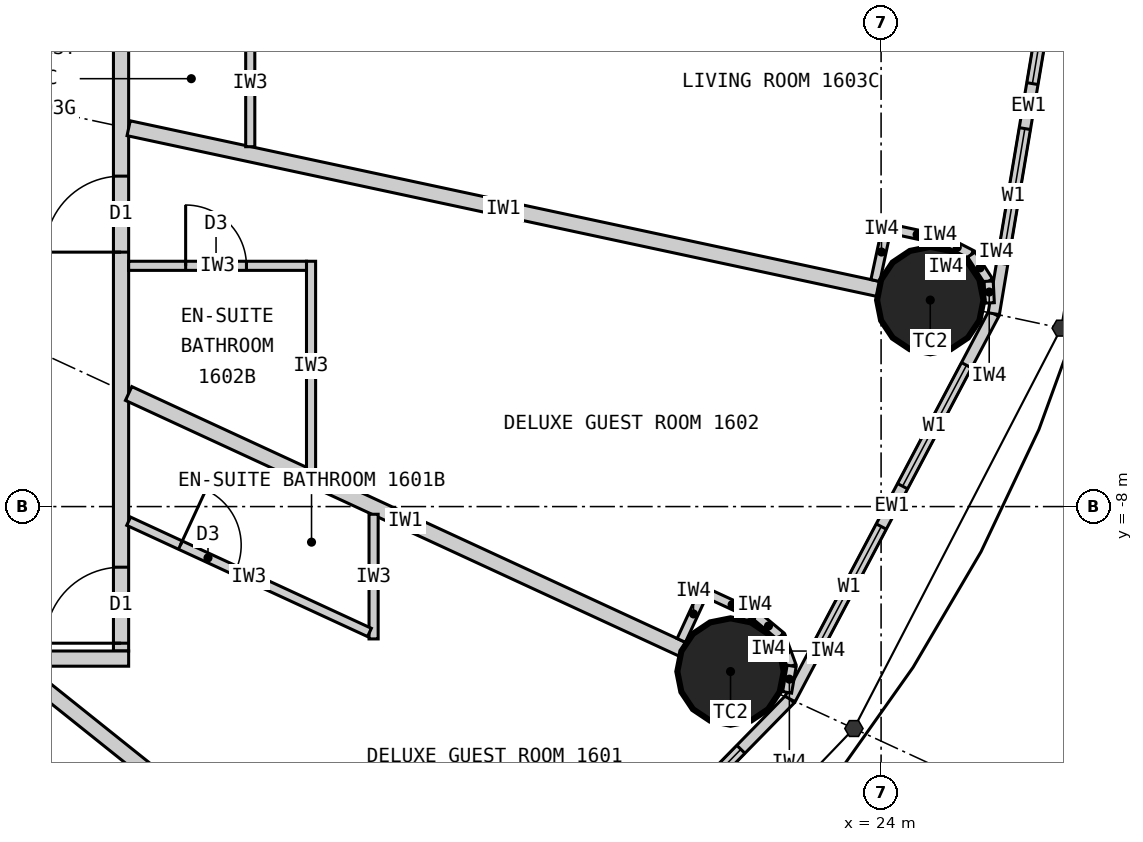
"""IFC4 building model, lengths in metres.
Left out: names, types, materials, properties, quantities, classifications, styles, units other than length and angle.
Written with IfcOpenShell. Run it as: python <this file> out.ifc"""

import sys

from ifc_helpers import new_model, si_unit, direction, frame, frame_2d, origin, origin_2d, place, context, subcontext, project, spatial, rectangle, circle, extrude, element, fill, save


model = new_model("IFC4")
c1 = context("Model", 3, precision=1e-05, world=origin(), true_north=direction((0.0, 1.0)))
c2 = subcontext(c1, "Body", "Model", "MODEL_VIEW")
j1 = project(units=[si_unit("LENGTHUNIT", "METRE"), si_unit("PLANEANGLEUNIT", "RADIAN")], contexts=[c1])
p1 = place(None, origin())
s1 = spatial("IfcSite", under=j1, at=p1, CompositionType="ELEMENT")
p2 = place(p1, origin())
s2 = spatial("IfcBuilding", under=s1, at=p2, CompositionType="ELEMENT")
p3 = place(p2, frame((0.0, 0.0, 67.2)))
s3 = spatial("IfcBuildingStorey", under=s2, at=p3, CompositionType="ELEMENT", Elevation=67.2)
for number, where, z_axis, x_axis in (
    (1, (22.019, -10.17, 0.0), (0.0, 0.0, 1.0), (1.0, 0.0, 0.0)),
    (2, (24.647, -5.283, 0.0), (0.0, 0.0, 1.0), (1.0, 0.0, 0.0)),
):
    element("IfcColumn", number, at=place(p3, frame(where, z_axis=z_axis, x_axis=x_axis)), inside=s3, PredefinedType="COLUMN", context=c2, shape_type="SweptSolid", body=[
        extrude(circle(Radius=0.7, at=origin_2d()), origin(), (0.0, 0.0, 1.0), 3.3),
    ])
p4 = place(p3, frame((18.57, -14.856, 0.0), z_axis=(0.0, 0.0, 1.0), x_axis=(0.699602905915, 0.714531856557, 0.0)))
e3 = element("IfcWall", 3, at=p4, inside=s3, PredefinedType="ELEMENTEDWALL", context=c2, shape_type="SweptSolid", body=[
    extrude(rectangle(XDim=6.051, YDim=0.15, at=frame_2d((3.025, 0.0))), origin(), (0.0, 0.0, 1.0), 3.12),
])
p5 = place(p4, frame((0.926, 0.0, 0.9)))
e4 = element("IfcOpeningElement", 4, at=p5, cuts=e3, PredefinedType="OPENING", context=c2, shape_type="SweptSolid", body=[
    extrude(rectangle(XDim=1.8, YDim=1.9, at=frame_2d((0.9, 0.95))), frame((0.0, 0.085, 0.0), z_axis=(0.0, -1.0, 0.0), x_axis=(1.0, 0.0, 0.0)), (0.0, 0.0, 1.0), 0.17),
])
p6 = place(p4, frame((3.325, 0.0, 0.9)))
e5 = element("IfcOpeningElement", 5, at=p6, cuts=e3, PredefinedType="OPENING", context=c2, shape_type="SweptSolid", body=[
    extrude(rectangle(XDim=1.8, YDim=1.9, at=frame_2d((0.9, 0.95))), frame((0.0, 0.085, 0.0), z_axis=(0.0, -1.0, 0.0), x_axis=(1.0, 0.0, 0.0)), (0.0, 0.0, 1.0), 0.17),
])
p7 = place(p3, frame((22.803, -10.532, 0.0), z_axis=(0.0, 0.0, 1.0), x_axis=(0.467296867008, 0.884100468321, 0.0)))
e6 = element("IfcWall", 6, at=p7, inside=s3, PredefinedType="ELEMENTEDWALL", context=c2, shape_type="SweptSolid", body=[
    extrude(rectangle(XDim=5.734, YDim=0.15, at=frame_2d((2.867, 0.0))), origin(), (0.0, 0.0, 1.0), 3.12),
])
p8 = place(p7, frame((0.767, 0.0, 0.9)))
e7 = element("IfcOpeningElement", 7, at=p8, cuts=e6, PredefinedType="OPENING", context=c2, shape_type="SweptSolid", body=[
    extrude(rectangle(XDim=1.8, YDim=1.9, at=frame_2d((0.9, 0.95))), frame((0.0, 0.085, 0.0), z_axis=(0.0, -1.0, 0.0), x_axis=(1.0, 0.0, 0.0)), (0.0, 0.0, 1.0), 0.17),
])
p9 = place(p7, frame((3.167, 0.0, 0.9)))
e8 = element("IfcOpeningElement", 8, at=p9, cuts=e6, PredefinedType="OPENING", context=c2, shape_type="SweptSolid", body=[
    extrude(rectangle(XDim=1.8, YDim=1.9, at=frame_2d((0.9, 0.95))), frame((0.0, 0.085, 0.0), z_axis=(0.0, -1.0, 0.0), x_axis=(1.0, 0.0, 0.0)), (0.0, 0.0, 1.0), 0.17),
])
p10 = place(p3, frame((25.482, -5.462, 0.0), z_axis=(0.0, 0.0, 1.0), x_axis=(0.165642551694, 0.986185857264, 0.0)))
e9 = element("IfcWall", 9, at=p10, inside=s3, PredefinedType="ELEMENTEDWALL", context=c2, shape_type="SweptSolid", body=[
    extrude(rectangle(XDim=5.539, YDim=0.15, at=frame_2d((2.77, 0.0))), origin(), (0.0, 0.0, 1.0), 3.12),
])
p11 = place(p10, frame((0.669, 0.0, 0.9)))
e10 = element("IfcOpeningElement", 10, at=p11, cuts=e9, PredefinedType="OPENING", context=c2, shape_type="SweptSolid", body=[
    extrude(rectangle(XDim=1.8, YDim=1.9, at=frame_2d((0.9, 0.95))), frame((0.0, 0.085, 0.0), z_axis=(0.0, -1.0, 0.0), x_axis=(1.0, 0.0, 0.0)), (0.0, 0.0, 1.0), 0.17),
])
p12 = place(p10, frame((3.07, 0.0, 0.9)))
e11 = element("IfcOpeningElement", 11, at=p12, cuts=e9, PredefinedType="OPENING", context=c2, shape_type="SweptSolid", body=[
    extrude(rectangle(XDim=1.8, YDim=1.9, at=frame_2d((0.9, 0.95))), frame((0.0, 0.085, 0.0), z_axis=(0.0, -1.0, 0.0), x_axis=(1.0, 0.0, 0.0)), (0.0, 0.0, 1.0), 0.17),
])
p13 = place(p3, frame((14.0, -9.9, 0.0), z_axis=(0.0, 0.0, 1.0), x_axis=(0.0, 1.0, 0.0)))
e12 = element("IfcWall", 12, at=p13, inside=s3, PredefinedType="PARTITIONING", context=c2, shape_type="SweptSolid", body=[
    extrude(rectangle(XDim=19.8, YDim=0.2, at=frame_2d((9.9, 0.0))), origin(), (0.0, 0.0, 1.0), 3.12),
])
p14 = place(p13, frame((0.103, 0.0, 0.0)))
e13 = element("IfcOpeningElement", 13, at=p14, cuts=e12, PredefinedType="OPENING", context=c2, shape_type="SweptSolid", body=[
    extrude(rectangle(XDim=1.0, YDim=2.2, at=frame_2d((0.5, 1.1))), frame((0.0, 0.11, 0.0), z_axis=(0.0, -1.0, 0.0), x_axis=(1.0, 0.0, 0.0)), (0.0, 0.0, 1.0), 0.22),
])
p15 = place(p13, frame((5.248, 0.0, 0.0)))
e14 = element("IfcOpeningElement", 14, at=p15, cuts=e12, PredefinedType="OPENING", context=c2, shape_type="SweptSolid", body=[
    extrude(rectangle(XDim=1.0, YDim=2.2, at=frame_2d((0.5, 1.1))), frame((0.0, 0.11, 0.0), z_axis=(0.0, -1.0, 0.0), x_axis=(1.0, 0.0, 0.0)), (0.0, 0.0, 1.0), 0.22),
])
p16 = place(p13, frame((8.438, 0.0, 0.0)))
e15 = element("IfcOpeningElement", 15, at=p16, cuts=e12, PredefinedType="OPENING", context=c2, shape_type="SweptSolid", body=[
    extrude(rectangle(XDim=1.0, YDim=2.2, at=frame_2d((0.5, 1.1))), frame((0.0, 0.11, 0.0), z_axis=(0.0, -1.0, 0.0), x_axis=(1.0, 0.0, 0.0)), (0.0, 0.0, 1.0), 0.22),
])
p17 = place(p13, frame((14.532, 0.0, 0.0)))
e16 = element("IfcOpeningElement", 16, at=p17, cuts=e12, PredefinedType="OPENING", context=c2, shape_type="SweptSolid", body=[
    extrude(rectangle(XDim=1.0, YDim=2.2, at=frame_2d((0.5, 1.1))), frame((0.0, 0.11, 0.0), z_axis=(0.0, -1.0, 0.0), x_axis=(1.0, 0.0, 0.0)), (0.0, 0.0, 1.0), 0.22),
])
p18 = place(p3, frame((14.1, -10.0, 0.0), z_axis=(0.0, 0.0, 1.0), x_axis=(-1.0, 0.0, 0.0)))
e17 = element("IfcWall", 17, at=p18, inside=s3, PredefinedType="PARTITIONING", context=c2, shape_type="SweptSolid", body=[
    extrude(rectangle(XDim=28.2, YDim=0.2, at=frame_2d((14.1, 0.0))), origin(), (0.0, 0.0, 1.0), 3.12),
])
p19 = place(p18, frame((23.865, 0.0, 0.0)))
e18 = element("IfcOpeningElement", 18, at=p19, cuts=e17, PredefinedType="OPENING", context=c2, shape_type="SweptSolid", body=[
    extrude(rectangle(XDim=1.0, YDim=2.2, at=frame_2d((0.5, 1.1))), frame((0.0, 0.11, 0.0), z_axis=(0.0, -1.0, 0.0), x_axis=(1.0, 0.0, 0.0)), (0.0, 0.0, 1.0), 0.22),
])
p20 = place(p18, frame((18.529, 0.0, 0.0)))
e19 = element("IfcOpeningElement", 19, at=p20, cuts=e17, PredefinedType="OPENING", context=c2, shape_type="SweptSolid", body=[
    extrude(rectangle(XDim=1.0, YDim=2.2, at=frame_2d((0.5, 1.1))), frame((0.0, 0.11, 0.0), z_axis=(0.0, -1.0, 0.0), x_axis=(1.0, 0.0, 0.0)), (0.0, 0.0, 1.0), 0.22),
])
p21 = place(p18, frame((14.623, 0.0, 0.0)))
e20 = element("IfcOpeningElement", 20, at=p21, cuts=e17, PredefinedType="OPENING", context=c2, shape_type="SweptSolid", body=[
    extrude(rectangle(XDim=1.0, YDim=2.2, at=frame_2d((0.5, 1.1))), frame((0.0, 0.11, 0.0), z_axis=(0.0, -1.0, 0.0), x_axis=(1.0, 0.0, 0.0)), (0.0, 0.0, 1.0), 0.22),
])
p22 = place(p18, frame((11.24, 0.0, 0.0)))
e21 = element("IfcOpeningElement", 21, at=p22, cuts=e17, PredefinedType="OPENING", context=c2, shape_type="SweptSolid", body=[
    extrude(rectangle(XDim=1.0, YDim=2.2, at=frame_2d((0.5, 1.1))), frame((0.0, 0.11, 0.0), z_axis=(0.0, -1.0, 0.0), x_axis=(1.0, 0.0, 0.0)), (0.0, 0.0, 1.0), 0.22),
])
p23 = place(p18, frame((8.671, 0.0, 0.0)))
e22 = element("IfcOpeningElement", 22, at=p23, cuts=e17, PredefinedType="OPENING", context=c2, shape_type="SweptSolid", body=[
    extrude(rectangle(XDim=1.0, YDim=2.2, at=frame_2d((0.5, 1.1))), frame((0.0, 0.11, 0.0), z_axis=(0.0, -1.0, 0.0), x_axis=(1.0, 0.0, 0.0)), (0.0, 0.0, 1.0), 0.22),
])
p24 = place(p18, frame((2.801, 0.0, 0.0)))
e23 = element("IfcOpeningElement", 23, at=p24, cuts=e17, PredefinedType="OPENING", context=c2, shape_type="SweptSolid", body=[
    extrude(rectangle(XDim=1.0, YDim=2.2, at=frame_2d((0.5, 1.1))), frame((0.0, 0.11, 0.0), z_axis=(0.0, -1.0, 0.0), x_axis=(1.0, 0.0, 0.0)), (0.0, 0.0, 1.0), 0.22),
])
p25 = place(p3, frame((12.625, -10.1, 0.0), z_axis=(0.0, 0.0, 1.0), x_axis=(0.780892451574, -0.624665493744, 0.0)))
e24 = element("IfcWall", 24, at=p25, inside=s3, PredefinedType="PARTITIONING", context=c2, shape_type="SweptSolid", body=[
    extrude(rectangle(XDim=6.045, YDim=0.2, at=frame_2d((3.022, 0.0))), origin(), (0.0, 0.0, 1.0), 2.32),
])
p26 = place(p3, frame((14.1, -6.512, 0.0), z_axis=(0.0, 0.0, 1.0), x_axis=(0.907832871056, -0.419332181247, 0.0)))
e25 = element("IfcWall", 25, at=p26, inside=s3, PredefinedType="PARTITIONING", context=c2, shape_type="SweptSolid", body=[
    extrude(rectangle(XDim=8.023, YDim=0.2, at=frame_2d((4.011, 0.0))), origin(), (0.0, 0.0, 1.0), 2.32),
])
p27 = place(p3, frame((14.1, -3.022, 0.0), z_axis=(0.0, 0.0, 1.0), x_axis=(0.977790014929, -0.209586943072, 0.0)))
e26 = element("IfcWall", 26, at=p27, inside=s3, PredefinedType="PARTITIONING", context=c2, shape_type="SweptSolid", body=[
    extrude(rectangle(XDim=10.087, YDim=0.2, at=frame_2d((5.043, 0.0))), origin(), (0.0, 0.0, 1.0), 2.32),
])
p28 = place(p3, frame((17.323, -8.101, 0.0), z_axis=(0.0, 0.0, 1.0), x_axis=(0.0, -1.0, 0.0)))
e27 = element("IfcWall", 27, at=p28, inside=s3, PredefinedType="PARTITIONING", context=c2, shape_type="SweptSolid", body=[
    extrude(rectangle(XDim=1.64, YDim=0.12, at=frame_2d((0.82, 0.0))), origin(), (0.0, 0.0, 1.0), 3.12),
])
p29 = place(p3, frame((14.1, -8.193, 0.0), z_axis=(0.0, 0.0, 1.0), x_axis=(0.907836493557, -0.419324338628, 0.0)))
e28 = element("IfcWall", 28, at=p29, inside=s3, PredefinedType="PARTITIONING", context=c2, shape_type="SweptSolid", body=[
    extrude(rectangle(XDim=3.49, YDim=0.12, at=frame_2d((1.745, 0.0))), origin(), (0.0, 0.0, 1.0), 3.12),
])
p30 = place(p29, frame((0.75, 0.0, 0.0)))
e29 = element("IfcOpeningElement", 29, at=p30, cuts=e28, PredefinedType="OPENING", context=c2, shape_type="SweptSolid", body=[
    extrude(rectangle(XDim=0.8, YDim=2.1, at=frame_2d((0.4, 1.05))), frame((0.0, 0.07, 0.0), z_axis=(0.0, -1.0, 0.0), x_axis=(1.0, 0.0, 0.0)), (0.0, 0.0, 1.0), 0.14),
])
p31 = place(p3, frame((16.5, -7.521, 0.0), z_axis=(0.0, 0.0, 1.0), x_axis=(0.0, 1.0, 0.0)))
e30 = element("IfcWall", 30, at=p31, inside=s3, PredefinedType="PARTITIONING", context=c2, shape_type="SweptSolid", body=[
    extrude(rectangle(XDim=2.749, YDim=0.12, at=frame_2d((1.374, 0.0))), origin(), (0.0, 0.0, 1.0), 3.12),
])
p32 = place(p3, frame((14.1, -4.833, 0.0), z_axis=(0.0, 0.0, 1.0), x_axis=(1.0, 0.0, 0.0)))
e31 = element("IfcWall", 31, at=p32, inside=s3, PredefinedType="PARTITIONING", context=c2, shape_type="SweptSolid", body=[
    extrude(rectangle(XDim=2.34, YDim=0.12, at=frame_2d((1.17, 0.0))), origin(), (0.0, 0.0, 1.0), 3.12),
])
p33 = place(p32, frame((0.75, 0.0, 0.0)))
e32 = element("IfcOpeningElement", 32, at=p33, cuts=e31, PredefinedType="OPENING", context=c2, shape_type="SweptSolid", body=[
    extrude(rectangle(XDim=0.8, YDim=2.1, at=frame_2d((0.4, 1.05))), frame((0.0, 0.07, 0.0), z_axis=(0.0, -1.0, 0.0), x_axis=(1.0, 0.0, 0.0)), (0.0, 0.0, 1.0), 0.14),
])
p34 = place(p3, frame((15.7, -3.265, 0.0), z_axis=(0.0, 0.0, 1.0), x_axis=(0.0, 1.0, 0.0)))
e33 = element("IfcWall", 33, at=p34, inside=s3, PredefinedType="PARTITIONING", context=c2, shape_type="SweptSolid", body=[
    extrude(rectangle(XDim=1.683, YDim=0.12, at=frame_2d((0.841, 0.0))), origin(), (0.0, 0.0, 1.0), 3.12),
])
p35 = place(p3, frame((21.371, -9.761, 0.0), z_axis=(0.0, 0.0, 1.0), x_axis=(0.419259891039, 0.907866258744, 0.0)))
e34 = element("IfcWall", 34, at=p35, inside=s3, PredefinedType="PARTITIONING", context=c2, shape_type="SweptSolid", body=[
    extrude(rectangle(XDim=0.768, YDim=0.12, at=frame_2d((0.384, 0.0))), origin(), (0.0, 0.0, 1.0), 3.12),
])
p36 = place(p3, frame((21.722, -9.144, 0.0), z_axis=(0.0, 0.0, 1.0), x_axis=(0.907877701396, -0.419235112208, 0.0)))
e35 = element("IfcWall", 35, at=p36, inside=s3, PredefinedType="PARTITIONING", context=c2, shape_type="SweptSolid", body=[
    extrude(rectangle(XDim=0.7, YDim=0.12, at=frame_2d((0.35, 0.0))), origin(), (0.0, 0.0, 1.0), 3.12),
])
p37 = place(p3, frame((22.358, -9.437, 0.0), z_axis=(0.0, 0.0, 1.0), x_axis=(0.768412687942, -0.639954639806, 0.0)))
e36 = element("IfcWall", 36, at=p37, inside=s3, PredefinedType="PARTITIONING", context=c2, shape_type="SweptSolid", body=[
    extrude(rectangle(XDim=0.418, YDim=0.12, at=frame_2d((0.209, 0.0))), origin(), (0.0, 0.0, 1.0), 3.12),
])
p38 = place(p3, frame((22.679, -9.705, 0.0), z_axis=(0.0, 0.0, 1.0), x_axis=(0.345164001646, -0.938542386879, 0.0)))
e37 = element("IfcWall", 37, at=p38, inside=s3, PredefinedType="PARTITIONING", context=c2, shape_type="SweptSolid", body=[
    extrude(rectangle(XDim=0.418, YDim=0.12, at=frame_2d((0.209, 0.0))), origin(), (0.0, 0.0, 1.0), 3.12),
])
p39 = place(p3, frame((22.823, -10.097, 0.0), z_axis=(0.0, 0.0, 1.0), x_axis=(-0.169674995186, -0.985500074079, 0.0)))
e38 = element("IfcWall", 38, at=p39, inside=s3, PredefinedType="PARTITIONING", context=c2, shape_type="SweptSolid", body=[
    extrude(rectangle(XDim=0.353, YDim=0.12, at=frame_2d((0.176, 0.0))), origin(), (0.0, 0.0, 1.0), 3.12),
])
p40 = place(p3, frame((23.925, -5.026, 0.0), z_axis=(0.0, 0.0, 1.0), x_axis=(0.209681192172, 0.977769808109, 0.0)))
e39 = element("IfcWall", 39, at=p40, inside=s3, PredefinedType="PARTITIONING", context=c2, shape_type="SweptSolid", body=[
    extrude(rectangle(XDim=0.767, YDim=0.12, at=frame_2d((0.384, 0.0))), origin(), (0.0, 0.0, 1.0), 3.12),
])
p41 = place(p3, frame((24.132, -4.347, 0.0), z_axis=(0.0, 0.0, 1.0), x_axis=(0.977776882509, -0.209648200638, 0.0)))
e40 = element("IfcWall", 40, at=p41, inside=s3, PredefinedType="PARTITIONING", context=c2, shape_type="SweptSolid", body=[
    extrude(rectangle(XDim=0.7, YDim=0.12, at=frame_2d((0.35, 0.0))), origin(), (0.0, 0.0, 1.0), 3.12),
])
for number, where, z_axis, x_axis in (
    (41, (24.816, -4.494, 0.0), (0.0, 0.0, 1.0), (0.89, -0.455, 0.0)),
    (42, (25.188, -4.684, 0.0), (0.0, 0.0, 1.0), (0.543, -0.84, 0.0)),
):
    element("IfcWall", number, at=place(p3, frame(where, z_axis=z_axis, x_axis=x_axis)), inside=s3, PredefinedType="PARTITIONING", context=c2, shape_type="SweptSolid", body=[
        extrude(rectangle(XDim=0.418, YDim=0.12, at=frame_2d((0.209, 0.0))), origin(), (0.0, 0.0, 1.0), 3.12),
    ])
p42 = place(p3, frame((25.416, -5.035, 0.0), z_axis=(0.0, 0.0, 1.0), x_axis=(0.050406329159, -0.998728793007, 0.0)))
e43 = element("IfcWall", 43, at=p42, inside=s3, PredefinedType="PARTITIONING", context=c2, shape_type="SweptSolid", body=[
    extrude(rectangle(XDim=0.286, YDim=0.12, at=frame_2d((0.143, 0.0))), origin(), (0.0, 0.0, 1.0), 3.12),
])
p43 = place(p6, origin())
e44 = element("IfcWindow", 44, at=p43, inside=s3, PartitioningType="SINGLE_PANEL", PredefinedType="WINDOW", context=c2, shape_type="SweptSolid", body=[
    extrude(rectangle(XDim=1.8, YDim=1.9, at=frame_2d((0.9, 0.95))), frame((0.0, 0.03, 0.0), z_axis=(0.0, -1.0, 0.0), x_axis=(1.0, 0.0, 0.0)), (0.0, 0.0, 1.0), 0.06),
])
fill(e5, e44)
p44 = place(p8, origin())
e45 = element("IfcWindow", 45, at=p44, inside=s3, PartitioningType="SINGLE_PANEL", PredefinedType="WINDOW", context=c2, shape_type="SweptSolid", body=[
    extrude(rectangle(XDim=1.8, YDim=1.9, at=frame_2d((0.9, 0.95))), frame((0.0, 0.03, 0.0), z_axis=(0.0, -1.0, 0.0), x_axis=(1.0, 0.0, 0.0)), (0.0, 0.0, 1.0), 0.06),
])
fill(e7, e45)
p45 = place(p9, origin())
e46 = element("IfcWindow", 46, at=p45, inside=s3, PartitioningType="SINGLE_PANEL", PredefinedType="WINDOW", context=c2, shape_type="SweptSolid", body=[
    extrude(rectangle(XDim=1.8, YDim=1.9, at=frame_2d((0.9, 0.95))), frame((0.0, 0.03, 0.0), z_axis=(0.0, -1.0, 0.0), x_axis=(1.0, 0.0, 0.0)), (0.0, 0.0, 1.0), 0.06),
])
fill(e8, e46)
p46 = place(p11, origin())
e47 = element("IfcWindow", 47, at=p46, inside=s3, PartitioningType="SINGLE_PANEL", PredefinedType="WINDOW", context=c2, shape_type="SweptSolid", body=[
    extrude(rectangle(XDim=1.8, YDim=1.9, at=frame_2d((0.9, 0.95))), frame((0.0, 0.03, 0.0), z_axis=(0.0, -1.0, 0.0), x_axis=(1.0, 0.0, 0.0)), (0.0, 0.0, 1.0), 0.06),
])
fill(e10, e47)
p47 = place(p12, origin())
e48 = element("IfcWindow", 48, at=p47, inside=s3, PartitioningType="SINGLE_PANEL", PredefinedType="WINDOW", context=c2, shape_type="SweptSolid", body=[
    extrude(rectangle(XDim=1.8, YDim=1.9, at=frame_2d((0.9, 0.95))), frame((0.0, 0.03, 0.0), z_axis=(0.0, -1.0, 0.0), x_axis=(1.0, 0.0, 0.0)), (0.0, 0.0, 1.0), 0.06),
])
fill(e11, e48)
p48 = place(p30, origin())
e49 = element("IfcDoor", 49, at=p48, inside=s3, OperationType="SINGLE_SWING_LEFT", PredefinedType="DOOR", context=c2, shape_type="SweptSolid", body=[
    extrude(rectangle(XDim=0.8, YDim=2.1, at=frame_2d((0.4, 1.05))), frame((0.0, 0.025, 0.0), z_axis=(0.0, -1.0, 0.0), x_axis=(1.0, 0.0, 0.0)), (0.0, 0.0, 1.0), 0.05),
])
fill(e29, e49)
p49 = place(p14, origin())
e50 = element("IfcDoor", 50, at=p49, inside=s3, OperationType="SINGLE_SWING_LEFT", PredefinedType="DOOR", context=c2, shape_type="SweptSolid", body=[
    extrude(rectangle(XDim=1.0, YDim=2.2, at=frame_2d((0.5, 1.1))), frame((0.0, 0.025, 0.0), z_axis=(0.0, -1.0, 0.0), x_axis=(1.0, 0.0, 0.0)), (0.0, 0.0, 1.0), 0.05),
])
fill(e13, e50)
p50 = place(p33, origin())
e51 = element("IfcDoor", 51, at=p50, inside=s3, OperationType="SINGLE_SWING_LEFT", PredefinedType="DOOR", context=c2, shape_type="SweptSolid", body=[
    extrude(rectangle(XDim=0.8, YDim=2.1, at=frame_2d((0.4, 1.05))), frame((0.0, 0.025, 0.0), z_axis=(0.0, -1.0, 0.0), x_axis=(1.0, 0.0, 0.0)), (0.0, 0.0, 1.0), 0.05),
])
fill(e32, e51)
p51 = place(p15, origin())
e52 = element("IfcDoor", 52, at=p51, inside=s3, OperationType="SINGLE_SWING_LEFT", PredefinedType="DOOR", context=c2, shape_type="SweptSolid", body=[
    extrude(rectangle(XDim=1.0, YDim=2.2, at=frame_2d((0.5, 1.1))), frame((0.0, 0.025, 0.0), z_axis=(0.0, -1.0, 0.0), x_axis=(1.0, 0.0, 0.0)), (0.0, 0.0, 1.0), 0.05),
])
fill(e14, e52)
save(model, sys.argv[1])
